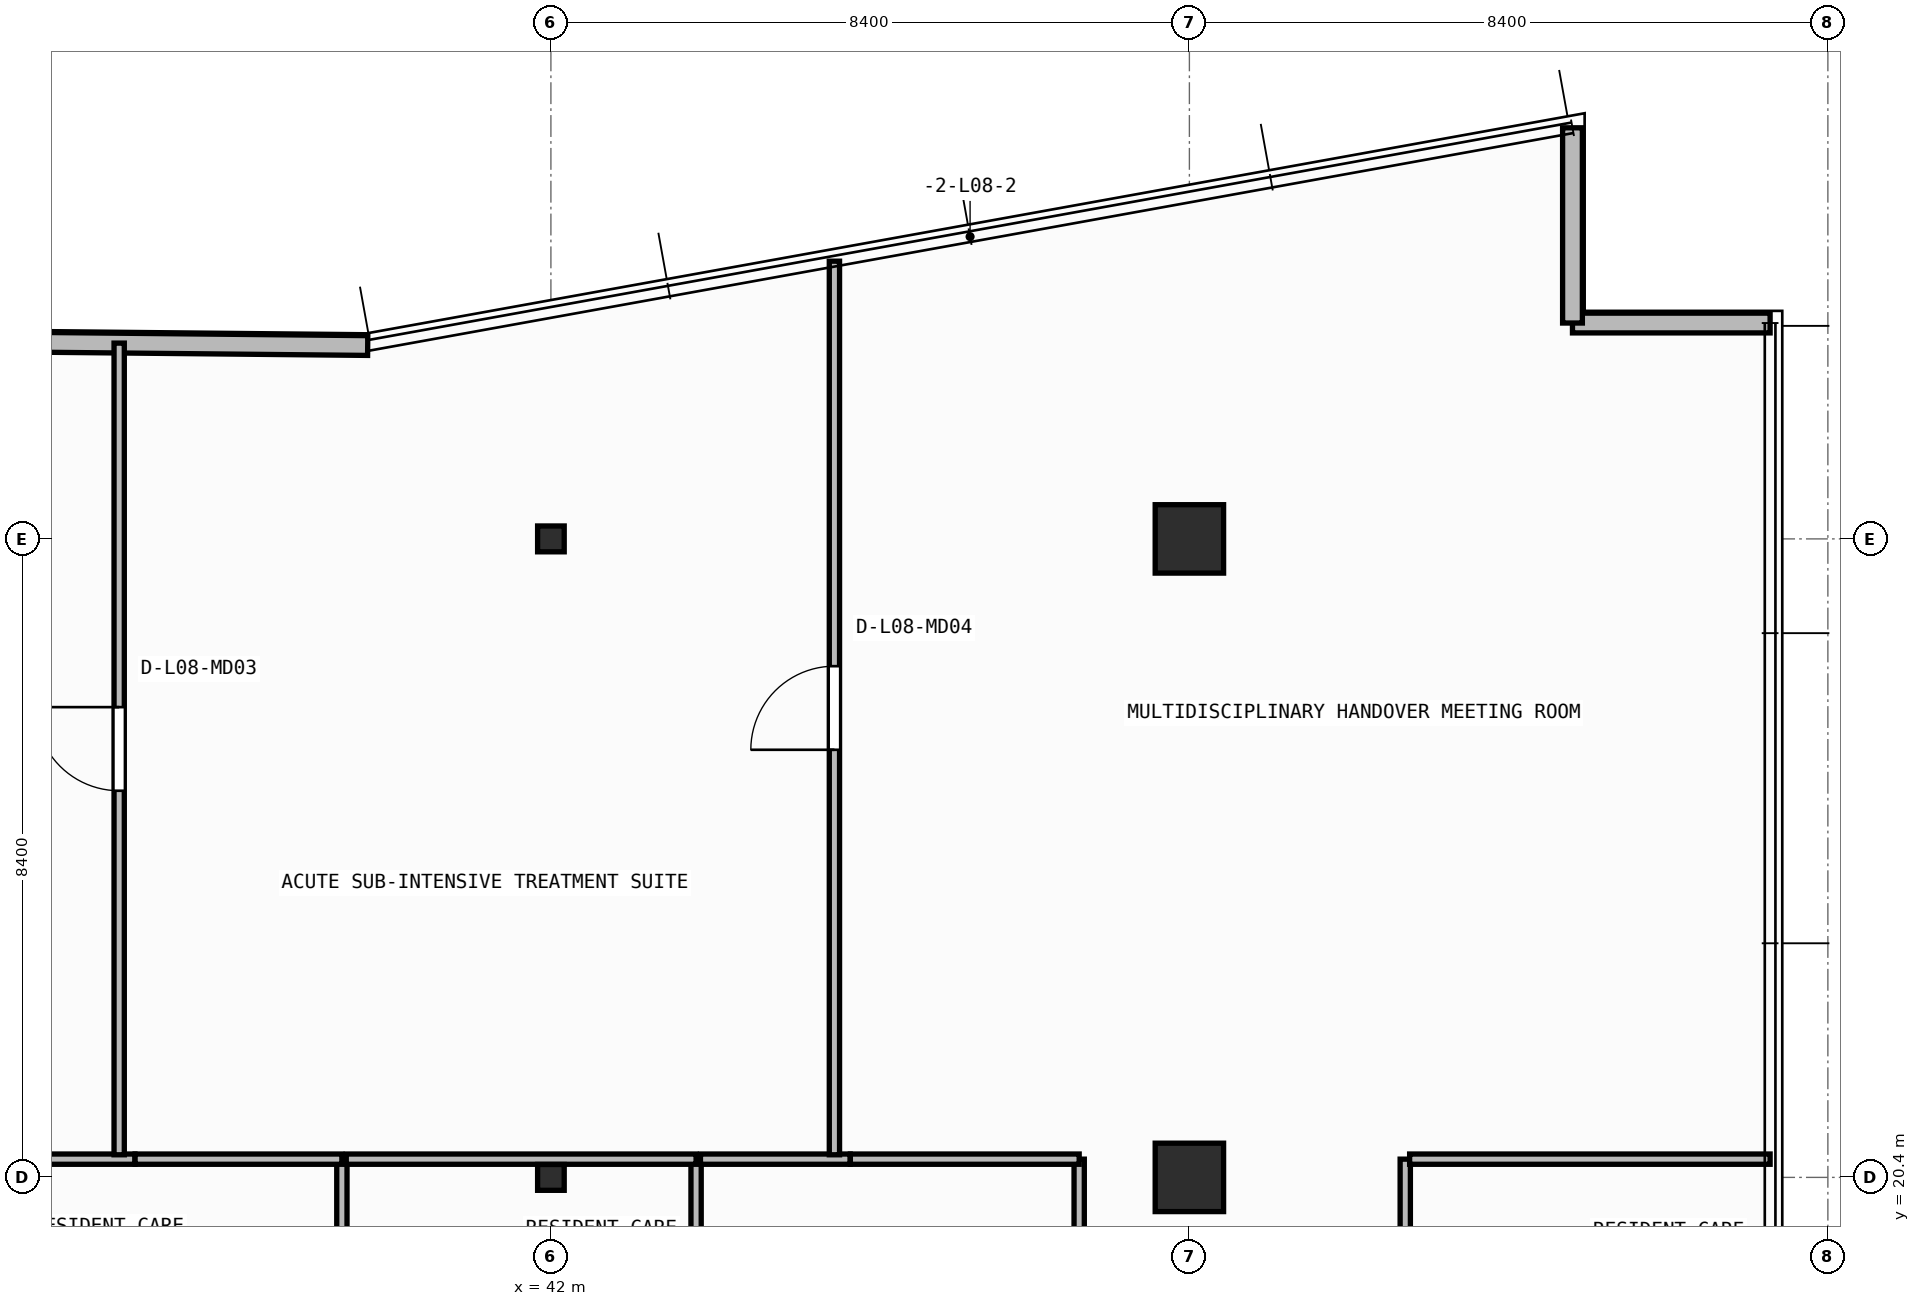
"""IFC4 building model, lengths in metres.
Left out: names, types, materials, properties, quantities, classifications, styles, units other than length and angle.
Written with IfcOpenShell. Run it as: python <this file> out.ifc"""

import sys

from ifc_helpers import new_model, si_unit, direction, frame, frame_2d, origin, origin_2d, place, context, subcontext, project, spatial, rectangle, i_section, extrude, element, fill, save


model = new_model("IFC4")
c1 = context("Model", 3, precision=1e-05, world=origin(), true_north=direction((0.0, 1.0)))
c2 = subcontext(c1, "Body", "Model", "MODEL_VIEW")
j1 = project(units=[si_unit("LENGTHUNIT", "METRE"), si_unit("PLANEANGLEUNIT", "RADIAN")], contexts=[c1])
p1 = place(None, origin())
s1 = spatial("IfcSite", under=j1, at=p1, CompositionType="ELEMENT")
p2 = place(p1, origin())
s2 = spatial("IfcBuilding", under=s1, at=p2, CompositionType="ELEMENT")
p3 = place(p2, frame((0.0, 0.0, 34.35)))
s3 = spatial("IfcBuildingStorey", under=s2, at=p3, CompositionType="ELEMENT", Elevation=34.35)
p4 = place(p3, frame((42.0, 20.4, 0.0), z_axis=(0.0, 0.0, 1.0), x_axis=(1.0, 0.0, 0.0)))
e1 = element("IfcColumn", 1, at=p4, inside=s3, PredefinedType="COLUMN", context=c2, shape_type="SweptSolid", body=[
    extrude(i_section(OverallWidth=0.35, OverallDepth=0.34, WebThickness=0.016, FlangeThickness=0.028, at=origin_2d()), origin(), (0.0, 0.0, 1.0), 3.95),
])
p5 = place(p3, frame((50.4, 20.4, 0.0), z_axis=(0.0, 0.0, 1.0), x_axis=(1.0, 0.0, 0.0)))
e2 = element("IfcColumn", 2, at=p5, inside=s3, PredefinedType="COLUMN", context=c2, shape_type="SweptSolid", body=[
    extrude(rectangle(XDim=0.9, YDim=0.9, at=origin_2d()), origin(), (0.0, 0.0, 1.0), 3.95),
])
p6 = place(p3, frame((42.0, 28.8, 0.0), z_axis=(0.0, 0.0, 1.0), x_axis=(1.0, 0.0, 0.0)))
e3 = element("IfcColumn", 3, at=p6, inside=s3, PredefinedType="COLUMN", context=c2, shape_type="SweptSolid", body=[
    extrude(i_section(OverallWidth=0.35, OverallDepth=0.34, WebThickness=0.016, FlangeThickness=0.028, at=origin_2d()), origin(), (0.0, 0.0, 1.0), 3.95),
])
p7 = place(p3, frame((50.4, 28.8, 0.0), z_axis=(0.0, 0.0, 1.0), x_axis=(1.0, 0.0, 0.0)))
e4 = element("IfcColumn", 4, at=p7, inside=s3, PredefinedType="COLUMN", context=c2, shape_type="SweptSolid", body=[
    extrude(rectangle(XDim=0.9, YDim=0.9, at=origin_2d()), origin(), (0.0, 0.0, 1.0), 3.95),
])
p8 = place(p3, frame((58.04, 31.64, 0.0), z_axis=(0.0, 0.0, 1.0), x_axis=(-1.0, 0.0, 0.0)))
e5 = element("IfcWall", 5, at=p8, inside=s3, PredefinedType="STANDARD", context=c2, shape_type="SweptSolid", body=[
    extrude(rectangle(XDim=2.6, YDim=0.26, at=frame_2d((1.3, 0.0))), origin(), (0.0, 0.0, 1.0), 3.71),
])
p9 = place(p3, frame((55.44, 31.64, 0.0), z_axis=(0.0, 0.0, 1.0), x_axis=(0.0, 1.0, 0.0)))
e6 = element("IfcWall", 6, at=p9, inside=s3, PredefinedType="STANDARD", context=c2, shape_type="SweptSolid", body=[
    extrude(rectangle(XDim=2.569, YDim=0.26, at=frame_2d((1.284, 0.0))), origin(), (0.0, 0.0, 1.0), 3.71),
])
p10 = place(p3, frame((39.59, 31.344, 0.0), z_axis=(0.0, 0.0, 1.0), x_axis=(-0.999952362926, 0.009760731435, 0.0)))
e7 = element("IfcWall", 7, at=p10, inside=s3, PredefinedType="STANDARD", context=c2, shape_type="SweptSolid", body=[
    extrude(rectangle(XDim=15.183, YDim=0.26, at=frame_2d((7.591, 0.0))), origin(), (0.0, 0.0, 1.0), 3.71),
])
p11 = place(p10, frame((6.391, 0.0, 0.9)))
e8 = element("IfcOpeningElement", 8, at=p11, cuts=e7, PredefinedType="OPENING", context=c2, shape_type="SweptSolid", body=[
    extrude(rectangle(XDim=2.4, YDim=1.65, at=frame_2d((1.2, 0.825))), frame((0.0, 0.14, 0.0), z_axis=(0.0, -1.0, 0.0), x_axis=(1.0, 0.0, 0.0)), (0.0, 0.0, 1.0), 0.28),
])
p12 = place(p3, frame((39.25, 17.833, 0.0), z_axis=(0.0, 0.0, 1.0), x_axis=(0.0, 1.0, 0.0)))
e9 = element("IfcWall", 9, at=p12, inside=s3, PredefinedType="PARTITIONING", context=c2, shape_type="SweptSolid", body=[
    extrude(rectangle(XDim=2.807, YDim=0.135, at=frame_2d((1.404, 0.0))), origin(), (0.0, 0.0, 1.0), 3.71),
])
p13 = place(p3, frame((36.528, 20.64, 0.0), z_axis=(0.0, 0.0, 1.0), x_axis=(-1.0, 0.0, 0.0)))
e10 = element("IfcWall", 10, at=p13, inside=s3, PredefinedType="PARTITIONING", context=c2, shape_type="SweptSolid", body=[
    extrude(rectangle(XDim=1.51, YDim=0.135, at=frame_2d((0.755, 0.0))), origin(), (0.0, 0.0, 1.0), 3.073),
])
p14 = place(p3, frame((39.25, 20.64, 0.0), z_axis=(0.0, 0.0, 1.0), x_axis=(-1.0, 0.0, 0.0)))
e11 = element("IfcWall", 11, at=p14, inside=s3, PredefinedType="PARTITIONING", context=c2, shape_type="SweptSolid", body=[
    extrude(rectangle(XDim=2.72, YDim=0.135, at=frame_2d((1.36, 0.0))), origin(), (0.0, 0.0, 1.0), 3.073),
])
p15 = place(p3, frame((43.91, 17.833, 0.0), z_axis=(0.0, 0.0, 1.0), x_axis=(0.0, 1.0, 0.0)))
e12 = element("IfcWall", 12, at=p15, inside=s3, PredefinedType="PARTITIONING", context=c2, shape_type="SweptSolid", body=[
    extrude(rectangle(XDim=2.807, YDim=0.135, at=frame_2d((1.404, 0.0))), origin(), (0.0, 0.0, 1.0), 3.71),
])
p16 = place(p3, frame((43.91, 20.64, 0.0), z_axis=(0.0, 0.0, 1.0), x_axis=(-1.0, 0.0, 0.0)))
e13 = element("IfcWall", 13, at=p16, inside=s3, PredefinedType="PARTITIONING", context=c2, shape_type="SweptSolid", body=[
    extrude(rectangle(XDim=4.602, YDim=0.135, at=frame_2d((2.301, 0.0))), origin(), (0.0, 0.0, 1.0), 3.073),
])
p17 = place(p3, frame((48.95, 17.833, 0.0), z_axis=(0.0, 0.0, 1.0), x_axis=(0.0, 1.0, 0.0)))
e14 = element("IfcWall", 14, at=p17, inside=s3, PredefinedType="PARTITIONING", context=c2, shape_type="SweptSolid", body=[
    extrude(rectangle(XDim=2.807, YDim=0.135, at=frame_2d((1.404, 0.0))), origin(), (0.0, 0.0, 1.0), 3.71),
])
p18 = place(p3, frame((45.938, 20.64, 0.0), z_axis=(0.0, 0.0, 1.0), x_axis=(-1.0, 0.0, 0.0)))
e15 = element("IfcWall", 15, at=p18, inside=s3, PredefinedType="PARTITIONING", context=c2, shape_type="SweptSolid", body=[
    extrude(rectangle(XDim=1.97, YDim=0.135, at=frame_2d((0.985, 0.0))), origin(), (0.0, 0.0, 1.0), 3.073),
])
p19 = place(p3, frame((48.95, 20.64, 0.0), z_axis=(0.0, 0.0, 1.0), x_axis=(-1.0, 0.0, 0.0)))
e16 = element("IfcWall", 16, at=p19, inside=s3, PredefinedType="PARTITIONING", context=c2, shape_type="SweptSolid", body=[
    extrude(rectangle(XDim=3.01, YDim=0.135, at=frame_2d((1.505, 0.0))), origin(), (0.0, 0.0, 1.0), 3.073),
])
p20 = place(p3, frame((53.24, 17.833, 0.0), z_axis=(0.0, 0.0, 1.0), x_axis=(0.0, 1.0, 0.0)))
e17 = element("IfcWall", 17, at=p20, inside=s3, PredefinedType="PARTITIONING", context=c2, shape_type="SweptSolid", body=[
    extrude(rectangle(XDim=2.807, YDim=0.135, at=frame_2d((1.404, 0.0))), origin(), (0.0, 0.0, 1.0), 3.71),
])
p21 = place(p3, frame((58.04, 20.64, 0.0), z_axis=(0.0, 0.0, 1.0), x_axis=(-1.0, 0.0, 0.0)))
e18 = element("IfcWall", 18, at=p21, inside=s3, PredefinedType="PARTITIONING", context=c2, shape_type="SweptSolid", body=[
    extrude(rectangle(XDim=4.742, YDim=0.135, at=frame_2d((2.371, 0.0))), origin(), (0.0, 0.0, 1.0), 3.71),
])
p22 = place(p3, frame((36.32, 20.698, 0.0), z_axis=(0.0, 0.0, 1.0), x_axis=(0.0, 1.0, 0.0)))
e19 = element("IfcWall", 19, at=p22, inside=s3, PredefinedType="PARTITIONING", context=c2, shape_type="SweptSolid", body=[
    extrude(rectangle(XDim=10.678, YDim=0.135, at=frame_2d((5.339, 0.0))), origin(), (0.0, 0.0, 1.0), 3.71),
])
p23 = place(p22, frame((4.789, 0.0, 0.0)))
e20 = element("IfcOpeningElement", 20, at=p23, cuts=e19, PredefinedType="OPENING", context=c2, shape_type="SweptSolid", body=[
    extrude(rectangle(XDim=1.1, YDim=2.1, at=frame_2d((0.55, 1.05))), frame((0.0, 0.077, 0.0), z_axis=(0.0, -1.0, 0.0), x_axis=(1.0, 0.0, 0.0)), (0.0, 0.0, 1.0), 0.155),
])
p24 = place(p3, frame((45.73, 20.698, 0.0), z_axis=(0.0, 0.0, 1.0), x_axis=(0.0, 1.0, 0.0)))
e21 = element("IfcWall", 21, at=p24, inside=s3, PredefinedType="PARTITIONING", context=c2, shape_type="SweptSolid", body=[
    extrude(rectangle(XDim=11.756, YDim=0.135, at=frame_2d((5.878, 0.0))), origin(), (0.0, 0.0, 1.0), 3.71),
])
p25 = place(p24, frame((5.328, 0.0, 0.0)))
e22 = element("IfcOpeningElement", 22, at=p25, cuts=e21, PredefinedType="OPENING", context=c2, shape_type="SweptSolid", body=[
    extrude(rectangle(XDim=1.1, YDim=2.1, at=frame_2d((0.55, 1.05))), frame((0.0, 0.077, 0.0), z_axis=(0.0, -1.0, 0.0), x_axis=(1.0, 0.0, 0.0)), (0.0, 0.0, 1.0), 0.155),
])
p26 = place(p23, origin())
e23 = element("IfcDoor", 23, at=p26, inside=s3, OperationType="SINGLE_SWING_RIGHT", PredefinedType="DOOR", context=c2, shape_type="SweptSolid", body=[
    extrude(rectangle(XDim=1.1, YDim=2.1, at=frame_2d((0.55, 1.05))), frame((0.0, 0.025, 0.0), z_axis=(0.0, -1.0, 0.0), x_axis=(1.0, 0.0, 0.0)), (0.0, 0.0, 1.0), 0.05),
])
fill(e20, e23)
p27 = place(p25, origin())
e24 = element("IfcDoor", 24, at=p27, inside=s3, OperationType="SINGLE_SWING_LEFT", PredefinedType="DOOR", context=c2, shape_type="SweptSolid", body=[
    extrude(rectangle(XDim=1.1, YDim=2.1, at=frame_2d((0.55, 1.05))), frame((0.0, 0.025, 0.0), z_axis=(0.0, -1.0, 0.0), x_axis=(1.0, 0.0, 0.0)), (0.0, 0.0, 1.0), 0.05),
])
fill(e22, e24)
save(model, sys.argv[1])
